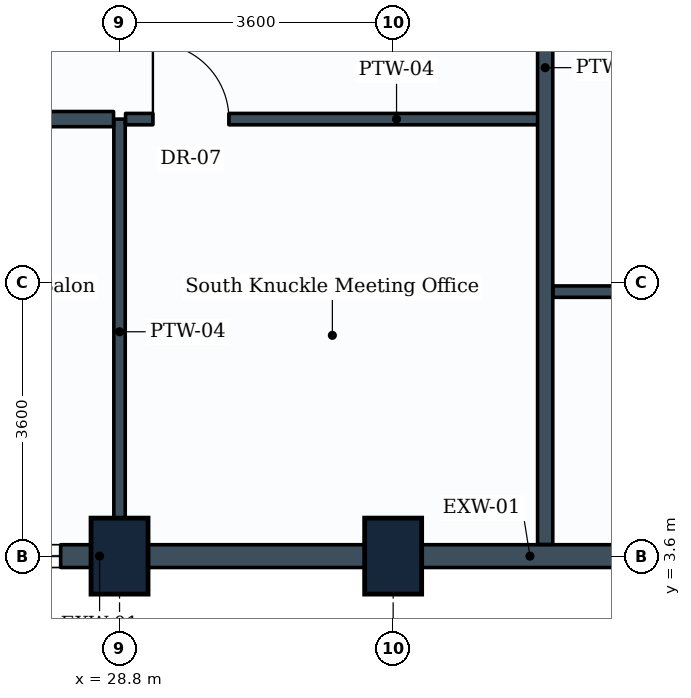
"""IFC4 building model, lengths in metres.
Left out: names, types, materials, properties, quantities, classifications, styles, units other than length and angle.
Written with IfcOpenShell. Run it as: python <this file> out.ifc"""

import sys

from ifc_helpers import new_model, si_unit, direction, frame, frame_2d, origin, origin_2d, place, context, subcontext, project, spatial, rectangle, extrude, element, fill, save


model = new_model("IFC4")
c1 = context("Model", 3, precision=1e-05, world=origin(), true_north=direction((0.0, 1.0)))
c2 = subcontext(c1, "Body", "Model", "MODEL_VIEW")
j1 = project(units=[si_unit("LENGTHUNIT", "METRE"), si_unit("PLANEANGLEUNIT", "RADIAN")], contexts=[c1])
p1 = place(None, origin())
s1 = spatial("IfcSite", under=j1, at=p1, CompositionType="ELEMENT")
p2 = place(p1, origin())
s2 = spatial("IfcBuilding", under=s1, at=p2, CompositionType="ELEMENT")
p3 = place(p2, frame((0.0, 0.0, 154.2)))
s3 = spatial("IfcBuildingStorey", under=s2, at=p3, CompositionType="ELEMENT", Elevation=154.2)
for number, where, z_axis, x_axis in (
    (1, (28.8, 3.6, 0.0), (0.0, 0.0, 1.0), (1.0, 0.0, 0.0)),
    (2, (32.4, 3.6, 0.0), (0.0, 0.0, 1.0), (1.0, 0.0, 0.0)),
):
    element("IfcColumn", number, at=place(p3, frame(where, z_axis=z_axis, x_axis=x_axis)), inside=s3, PredefinedType="COLUMN", context=c2, shape_type="SweptSolid", body=[
        extrude(rectangle(XDim=0.75, YDim=1.0, at=origin_2d()), origin(), (0.0, 0.0, 1.0), 3.8),
    ])
p4 = place(p3, frame((28.8, 3.6, 0.0), z_axis=(0.0, 0.0, 1.0), x_axis=(-1.0, 0.0, 0.0)))
e3 = element("IfcWall", 3, at=p4, inside=s3, PredefinedType="STANDARD", context=c2, shape_type="SweptSolid", body=[
    extrude(rectangle(XDim=3.6, YDim=0.3, at=frame_2d((1.8, 0.0))), origin(), (0.0, 0.0, 1.0), 2.93),
])
p5 = place(p4, frame((0.775, 0.0, 0.85)))
e4 = element("IfcOpeningElement", 4, at=p5, cuts=e3, PredefinedType="OPENING", context=c2, shape_type="SweptSolid", body=[
    extrude(rectangle(XDim=2.1, YDim=1.35, at=frame_2d((1.05, 0.675))), frame((0.0, 0.16, 0.0), z_axis=(0.0, -1.0, 0.0), x_axis=(1.0, 0.0, 0.0)), (0.0, 0.0, 1.0), 0.32),
])
p6 = place(p3, frame((32.4, 3.6, 0.0), z_axis=(0.0, 0.0, 1.0), x_axis=(-1.0, 0.0, 0.0)))
e5 = element("IfcWall", 5, at=p6, inside=s3, PredefinedType="STANDARD", context=c2, shape_type="SweptSolid", body=[
    extrude(rectangle(XDim=3.6, YDim=0.3, at=frame_2d((1.8, 0.0))), origin(), (0.0, 0.0, 1.0), 2.93),
])
p7 = place(p3, frame((36.0, 3.6, 0.0), z_axis=(0.0, 0.0, 1.0), x_axis=(-1.0, 0.0, 0.0)))
e6 = element("IfcWall", 6, at=p7, inside=s3, PredefinedType="STANDARD", context=c2, shape_type="SweptSolid", body=[
    extrude(rectangle(XDim=3.6, YDim=0.3, at=frame_2d((1.8, 0.0))), origin(), (0.0, 0.0, 1.0), 2.93),
])
p8 = place(p3, frame((28.8, 9.35, 0.0), z_axis=(0.0, 0.0, 1.0), x_axis=(0.0, -1.0, 0.0)))
e7 = element("IfcWall", 7, at=p8, inside=s3, PredefinedType="PARTITIONING", context=c2, shape_type="SweptSolid", body=[
    extrude(rectangle(XDim=5.596, YDim=0.15, at=frame_2d((2.798, 0.0))), origin(), (0.0, 0.0, 1.0), 3.535),
])
p9 = place(p3, frame((13.13, 9.35, 0.0), z_axis=(0.0, 0.0, 1.0), x_axis=(1.0, 0.0, 0.0)))
e8 = element("IfcWall", 8, at=p9, inside=s3, PredefinedType="PARTITIONING", context=c2, shape_type="SweptSolid", body=[
    extrude(rectangle(XDim=15.591, YDim=0.2, at=frame_2d((7.795, 0.0))), origin(), (0.0, 0.0, 1.0), 3.17),
])
p10 = place(p3, frame((28.879, 9.35, 0.0), z_axis=(0.0, 0.0, 1.0), x_axis=(1.0, 0.0, 0.0)))
e9 = element("IfcWall", 9, at=p10, inside=s3, PredefinedType="PARTITIONING", context=c2, shape_type="SweptSolid", body=[
    extrude(rectangle(XDim=5.521, YDim=0.15, at=frame_2d((2.76, 0.0))), origin(), (0.0, 0.0, 1.0), 3.535),
])
p11 = place(p10, frame((0.36, 0.0, 0.0)))
e10 = element("IfcOpeningElement", 10, at=p11, cuts=e9, PredefinedType="OPENING", context=c2, shape_type="SweptSolid", body=[
    extrude(rectangle(XDim=1.0, YDim=2.1, at=frame_2d((0.5, 1.05))), frame((0.0, 0.085, 0.0), z_axis=(0.0, -1.0, 0.0), x_axis=(1.0, 0.0, 0.0)), (0.0, 0.0, 1.0), 0.17),
])
p12 = place(p3, frame((34.4, 3.754, 0.0), z_axis=(0.0, 0.0, 1.0), x_axis=(0.0, 1.0, 0.0)))
e11 = element("IfcWall", 11, at=p12, inside=s3, PredefinedType="PARTITIONING", context=c2, shape_type="SweptSolid", body=[
    extrude(rectangle(XDim=12.546, YDim=0.2, at=frame_2d((6.273, 0.0))), origin(), (0.0, 0.0, 1.0), 2.93),
])
p13 = place(p3, frame((34.504, 7.08, 0.0), z_axis=(0.0, 0.0, 1.0), x_axis=(1.0, 0.0, 0.0)))
e12 = element("IfcWall", 12, at=p13, inside=s3, PredefinedType="PARTITIONING", context=c2, shape_type="SweptSolid", body=[
    extrude(rectangle(XDim=2.996, YDim=0.15, at=frame_2d((1.498, 0.0))), origin(), (0.0, 0.0, 1.0), 3.17),
])
p14 = place(p13, frame((1.021, 0.0, 0.0)))
e13 = element("IfcOpeningElement", 13, at=p14, cuts=e12, PredefinedType="OPENING", context=c2, shape_type="SweptSolid", body=[
    extrude(rectangle(XDim=0.85, YDim=2.1, at=frame_2d((0.425, 1.05))), frame((0.0, 0.085, 0.0), z_axis=(0.0, -1.0, 0.0), x_axis=(1.0, 0.0, 0.0)), (0.0, 0.0, 1.0), 0.17),
])
p15 = place(p5, origin())
e14 = element("IfcWindow", 14, at=p15, inside=s3, PartitioningType="SINGLE_PANEL", PredefinedType="WINDOW", context=c2, shape_type="SweptSolid", body=[
    extrude(rectangle(XDim=2.1, YDim=1.35, at=frame_2d((1.05, 0.675))), frame((0.0, 0.03, 0.0), z_axis=(0.0, -1.0, 0.0), x_axis=(1.0, 0.0, 0.0)), (0.0, 0.0, 1.0), 0.06),
])
fill(e4, e14)
p16 = place(p11, origin())
e15 = element("IfcDoor", 15, at=p16, inside=s3, OperationType="SINGLE_SWING_LEFT", PredefinedType="DOOR", context=c2, shape_type="SweptSolid", body=[
    extrude(rectangle(XDim=1.0, YDim=2.1, at=frame_2d((0.5, 1.05))), frame((0.0, 0.025, 0.0), z_axis=(0.0, -1.0, 0.0), x_axis=(1.0, 0.0, 0.0)), (0.0, 0.0, 1.0), 0.05),
])
fill(e10, e15)
save(model, sys.argv[1])
